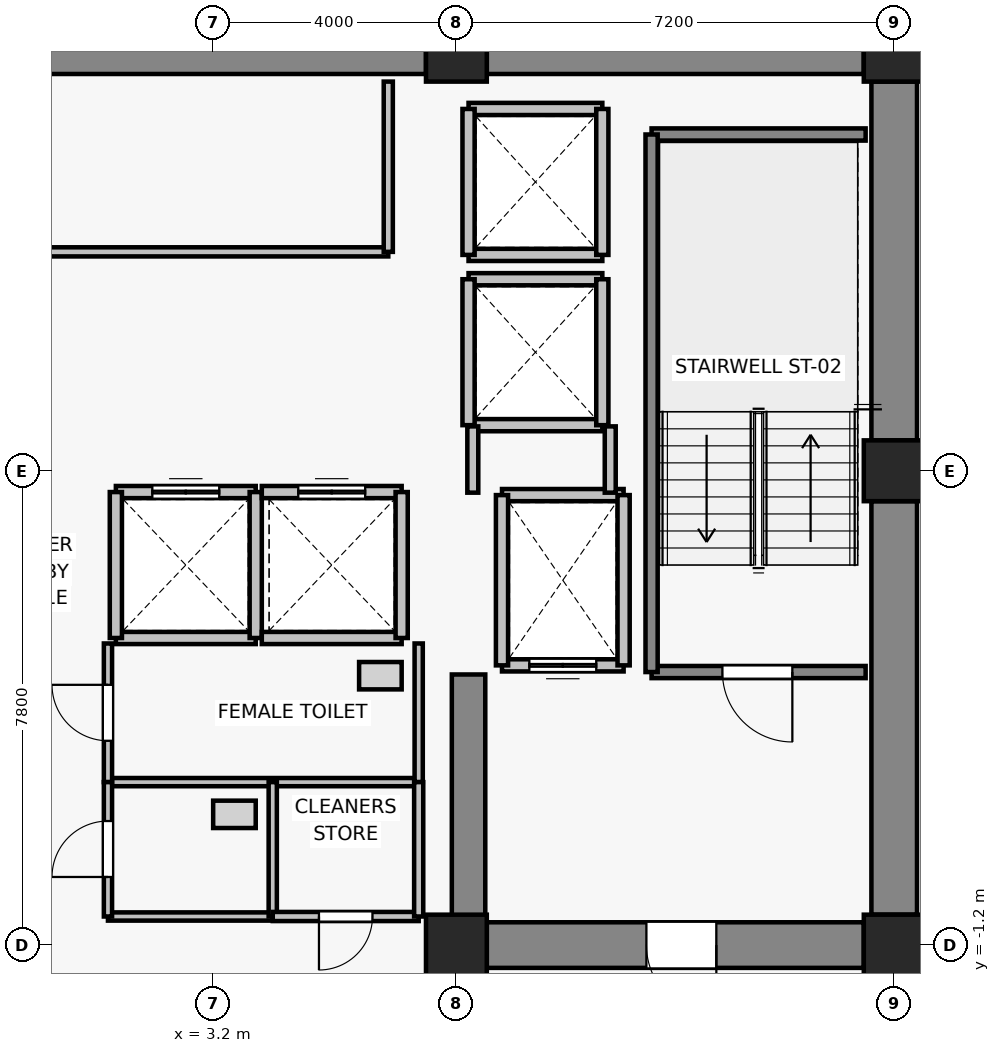
"""IFC4 building model, lengths in metres.
Left out: names, types, materials, properties, quantities, classifications, styles, units other than length and angle.
Written with IfcOpenShell. Run it as: python <this file> out.ifc"""

import sys

from ifc_helpers import new_model, si_unit, direction, frame, frame_2d, origin, origin_2d, place, context, subcontext, project, spatial, rectangle, extrude, source, transform, mapped, element, fill, save


model = new_model("IFC4")
c1 = context("Model", 3, precision=1e-05, world=origin(), true_north=direction((0.0, 1.0)))
c2 = subcontext(c1, "Body", "Model", "MODEL_VIEW")
j1 = project(units=[si_unit("LENGTHUNIT", "METRE"), si_unit("PLANEANGLEUNIT", "RADIAN")], contexts=[c1])
p1 = place(None, origin())
s1 = spatial("IfcSite", under=j1, at=p1, CompositionType="ELEMENT")
p2 = place(p1, origin())
s2 = spatial("IfcBuilding", under=s1, at=p2, CompositionType="ELEMENT")
p3 = place(p2, frame((0.0, 0.0, 166.0)))
s3 = spatial("IfcBuildingStorey", under=s2, at=p3, CompositionType="ELEMENT", Elevation=166.0)
for number, where, z_axis, x_axis in (
    (1, (7.2, -1.2, 0.0), (0.0, 0.0, 1.0), (1.0, 0.0, 0.0)),
    (2, (14.4, -1.2, 0.0), (0.0, 0.0, 1.0), (1.0, 0.0, 0.0)),
    (3, (14.4, 6.6, 0.0), (0.0, 0.0, 1.0), (1.0, 0.0, 0.0)),
    (4, (7.2, 13.5, 0.0), (0.0, 0.0, 1.0), (1.0, 0.0, 0.0)),
    (5, (14.4, 13.5, 0.0), (0.0, 0.0, 1.0), (1.0, 0.0, 0.0)),
):
    element("IfcColumn", number, at=place(p3, frame(where, z_axis=z_axis, x_axis=x_axis)), inside=s3, PredefinedType="COLUMN", context=c2, shape_type="SweptSolid", body=[
        extrude(rectangle(XDim=1.0, YDim=1.0, at=origin_2d()), origin(), (0.0, 0.0, 1.0), 3.3),
    ])
p4 = place(p3, frame((-6.7, 13.5, 0.0), z_axis=(0.0, 0.0, 1.0), x_axis=(1.0, 0.0, 0.0)))
e6 = element("IfcWall", 6, at=p4, inside=s3, PredefinedType="SHEAR", context=c2, shape_type="SweptSolid", body=[
    extrude(rectangle(XDim=13.4, YDim=0.75, at=frame_2d((6.7, 0.0))), origin(), (0.0, 0.0, 1.0), 3.075),
])
p5 = place(p3, frame((7.7, 13.5, 0.0), z_axis=(0.0, 0.0, 1.0), x_axis=(1.0, 0.0, 0.0)))
e7 = element("IfcWall", 7, at=p5, inside=s3, PredefinedType="SHEAR", context=c2, shape_type="SweptSolid", body=[
    extrude(rectangle(XDim=6.2, YDim=0.75, at=frame_2d((3.1, 0.0))), origin(), (0.0, 0.0, 1.0), 3.075),
])
p6 = place(p3, frame((14.4, -0.7, 0.0), z_axis=(0.0, 0.0, 1.0), x_axis=(0.0, 1.0, 0.0)))
e8 = element("IfcWall", 8, at=p6, inside=s3, PredefinedType="SHEAR", context=c2, shape_type="SweptSolid", body=[
    extrude(rectangle(XDim=6.8, YDim=0.75, at=frame_2d((3.4, 0.0))), origin(), (0.0, 0.0, 1.0), 3.075),
])
p7 = place(p3, frame((14.4, 7.1, 0.0), z_axis=(0.0, 0.0, 1.0), x_axis=(0.0, 1.0, 0.0)))
e9 = element("IfcWall", 9, at=p7, inside=s3, PredefinedType="SHEAR", context=c2, shape_type="SweptSolid", body=[
    extrude(rectangle(XDim=5.9, YDim=0.75, at=frame_2d((2.95, 0.0))), origin(), (0.0, 0.0, 1.0), 3.075),
])
p8 = place(p3, frame((13.9, -1.2, 0.0), z_axis=(0.0, 0.0, 1.0), x_axis=(-1.0, 0.0, 0.0)))
e10 = element("IfcWall", 10, at=p8, inside=s3, PredefinedType="SHEAR", context=c2, shape_type="SweptSolid", body=[
    extrude(rectangle(XDim=6.2, YDim=0.75, at=frame_2d((3.1, 0.0))), origin(), (0.0, 0.0, 1.0), 3.075),
])
p9 = place(p8, frame((2.425, 0.0, 0.0)))
e11 = element("IfcOpeningElement", 11, at=p9, cuts=e10, PredefinedType="OPENING", context=c2, shape_type="SweptSolid", body=[
    extrude(rectangle(XDim=1.15, YDim=2.15, at=frame_2d((0.575, 1.075))), frame((0.0, 0.385, 0.0), z_axis=(0.0, -1.0, 0.0), x_axis=(1.0, 0.0, 0.0)), (0.0, 0.0, 1.0), 0.77),
])
p10 = place(p3, frame((7.4, -0.825, 0.0), z_axis=(0.0, 0.0, 1.0), x_axis=(0.0, 1.0, 0.0)))
e12 = element("IfcWall", 12, at=p10, inside=s3, PredefinedType="SHEAR", context=c2, shape_type="SweptSolid", body=[
    extrude(rectangle(XDim=4.075, YDim=0.55, at=frame_2d((2.038, 0.0))), origin(), (0.0, 0.0, 1.0), 3.075),
])
p11 = place(p3, frame((9.95, 3.4, 0.0), z_axis=(0.0, 0.0, 1.0), x_axis=(-1.0, 0.0, 0.0)))
e13 = element("IfcWall", 13, at=p11, inside=s3, PredefinedType="SOLIDWALL", context=c2, shape_type="SweptSolid", body=[
    extrude(rectangle(XDim=2.0, YDim=0.2, at=frame_2d((1.0, 0.0))), origin(), (0.0, 0.0, 1.0), 3.075),
])
p12 = place(p11, frame((0.45, 0.0, 0.0)))
e14 = element("IfcOpeningElement", 14, at=p12, cuts=e13, PredefinedType="OPENING", context=c2, shape_type="SweptSolid", body=[
    extrude(rectangle(XDim=1.1, YDim=2.2, at=frame_2d((0.55, 1.1))), frame((0.0, 0.11, 0.0), z_axis=(0.0, -1.0, 0.0), x_axis=(1.0, 0.0, 0.0)), (0.0, 0.0, 1.0), 0.22),
])
p13 = place(p3, frame((7.95, 6.2, 0.0), z_axis=(0.0, 0.0, 1.0), x_axis=(1.0, 0.0, 0.0)))
e15 = element("IfcWall", 15, at=p13, inside=s3, PredefinedType="SOLIDWALL", context=c2, shape_type="SweptSolid", body=[
    extrude(rectangle(XDim=2.0, YDim=0.2, at=frame_2d((1.0, 0.0))), origin(), (0.0, 0.0, 1.0), 3.075),
])
for number, where, z_axis, x_axis in (
    (16, (7.95, 3.4, 0.0), (0.0, 0.0, 1.0), (0.0, 1.0, 0.0)),
    (17, (9.95, 6.2, 0.0), (0.0, 0.0, 1.0), (0.0, -1.0, 0.0)),
):
    element("IfcWall", number, at=place(p3, frame(where, z_axis=z_axis, x_axis=x_axis)), inside=s3, PredefinedType="SOLIDWALL", context=c2, shape_type="SweptSolid", body=[
        extrude(rectangle(XDim=2.8, YDim=0.2, at=frame_2d((1.4, 0.0))), origin(), (0.0, 0.0, 1.0), 3.075),
    ])
p14 = place(p3, frame((3.9, 3.85, 0.0), z_axis=(0.0, 0.0, 1.0), x_axis=(-1.0, 0.0, 0.0)))
e18 = element("IfcWall", 18, at=p14, inside=s3, PredefinedType="SOLIDWALL", context=c2, shape_type="SweptSolid", body=[
    extrude(rectangle(XDim=2.3, YDim=0.2, at=frame_2d((1.15, 0.0))), origin(), (0.0, 0.0, 1.0), 3.075),
])
p15 = place(p3, frame((1.6, 6.25, 0.0), z_axis=(0.0, 0.0, 1.0), x_axis=(1.0, 0.0, 0.0)))
e19 = element("IfcWall", 19, at=p15, inside=s3, PredefinedType="SOLIDWALL", context=c2, shape_type="SweptSolid", body=[
    extrude(rectangle(XDim=2.3, YDim=0.2, at=frame_2d((1.15, 0.0))), origin(), (0.0, 0.0, 1.0), 3.075),
])
p16 = place(p15, frame((0.6, 0.0, 0.0)))
e20 = element("IfcOpeningElement", 20, at=p16, cuts=e19, PredefinedType="OPENING", context=c2, shape_type="SweptSolid", body=[
    extrude(rectangle(XDim=1.1, YDim=2.2, at=frame_2d((0.55, 1.1))), frame((0.0, 0.11, 0.0), z_axis=(0.0, -1.0, 0.0), x_axis=(1.0, 0.0, 0.0)), (0.0, 0.0, 1.0), 0.22),
])
for number, where, z_axis, x_axis in (
    (21, (1.6, 3.85, 0.0), (0.0, 0.0, 1.0), (0.0, 1.0, 0.0)),
    (22, (3.9, 6.25, 0.0), (0.0, 0.0, 1.0), (0.0, -1.0, 0.0)),
):
    element("IfcWall", number, at=place(p3, frame(where, z_axis=z_axis, x_axis=x_axis)), inside=s3, PredefinedType="SOLIDWALL", context=c2, shape_type="SweptSolid", body=[
        extrude(rectangle(XDim=2.4, YDim=0.2, at=frame_2d((1.2, 0.0))), origin(), (0.0, 0.0, 1.0), 3.075),
    ])
p17 = place(p3, frame((6.3, 3.85, 0.0), z_axis=(0.0, 0.0, 1.0), x_axis=(-1.0, 0.0, 0.0)))
e23 = element("IfcWall", 23, at=p17, inside=s3, PredefinedType="SOLIDWALL", context=c2, shape_type="SweptSolid", body=[
    extrude(rectangle(XDim=2.3, YDim=0.2, at=frame_2d((1.15, 0.0))), origin(), (0.0, 0.0, 1.0), 3.075),
])
p18 = place(p3, frame((4.0, 6.25, 0.0), z_axis=(0.0, 0.0, 1.0), x_axis=(1.0, 0.0, 0.0)))
e24 = element("IfcWall", 24, at=p18, inside=s3, PredefinedType="SOLIDWALL", context=c2, shape_type="SweptSolid", body=[
    extrude(rectangle(XDim=2.3, YDim=0.2, at=frame_2d((1.15, 0.0))), origin(), (0.0, 0.0, 1.0), 3.075),
])
p19 = place(p18, frame((0.6, 0.0, 0.0)))
e25 = element("IfcOpeningElement", 25, at=p19, cuts=e24, PredefinedType="OPENING", context=c2, shape_type="SweptSolid", body=[
    extrude(rectangle(XDim=1.1, YDim=2.2, at=frame_2d((0.55, 1.1))), frame((0.0, 0.11, 0.0), z_axis=(0.0, -1.0, 0.0), x_axis=(1.0, 0.0, 0.0)), (0.0, 0.0, 1.0), 0.22),
])
p20 = place(p3, frame((6.3, 6.25, 0.0), z_axis=(0.0, 0.0, 1.0), x_axis=(0.0, -1.0, 0.0)))
e26 = element("IfcWall", 26, at=p20, inside=s3, PredefinedType="SOLIDWALL", context=c2, shape_type="SweptSolid", body=[
    extrude(rectangle(XDim=2.4, YDim=0.2, at=frame_2d((1.2, 0.0))), origin(), (0.0, 0.0, 1.0), 3.075),
])
for number, where, z_axis, x_axis in (
    (27, (9.6, 7.35, 0.0), (0.0, 0.0, 1.0), (-1.0, 0.0, 0.0)),
    (28, (7.4, 9.75, 0.0), (0.0, 0.0, 1.0), (1.0, 0.0, 0.0)),
):
    element("IfcWall", number, at=place(p3, frame(where, z_axis=z_axis, x_axis=x_axis)), inside=s3, PredefinedType="SOLIDWALL", context=c2, shape_type="SweptSolid", body=[
        extrude(rectangle(XDim=2.2, YDim=0.2, at=frame_2d((1.1, 0.0))), origin(), (0.0, 0.0, 1.0), 2.565),
    ])
p21 = place(p3, frame((7.4, 7.35, 0.0), z_axis=(0.0, 0.0, 1.0), x_axis=(0.0, 1.0, 0.0)))
e29 = element("IfcWall", 29, at=p21, inside=s3, PredefinedType="SOLIDWALL", context=c2, shape_type="SweptSolid", body=[
    extrude(rectangle(XDim=2.4, YDim=0.2, at=frame_2d((1.2, 0.0))), origin(), (0.0, 0.0, 1.0), 2.565),
])
p22 = place(p3, frame((9.6, 9.75, 0.0), z_axis=(0.0, 0.0, 1.0), x_axis=(0.0, -1.0, 0.0)))
e30 = element("IfcWall", 30, at=p22, inside=s3, PredefinedType="SOLIDWALL", context=c2, shape_type="SweptSolid", body=[
    extrude(rectangle(XDim=2.4, YDim=0.2, at=frame_2d((1.2, 0.0))), origin(), (0.0, 0.0, 1.0), 3.075),
])
for number, where, z_axis, x_axis in (
    (31, (9.6, 10.15, 0.0), (0.0, 0.0, 1.0), (-1.0, 0.0, 0.0)),
    (32, (7.4, 12.55, 0.0), (0.0, 0.0, 1.0), (1.0, 0.0, 0.0)),
):
    element("IfcWall", number, at=place(p3, frame(where, z_axis=z_axis, x_axis=x_axis)), inside=s3, PredefinedType="SOLIDWALL", context=c2, shape_type="SweptSolid", body=[
        extrude(rectangle(XDim=2.2, YDim=0.2, at=frame_2d((1.1, 0.0))), origin(), (0.0, 0.0, 1.0), 2.565),
    ])
p23 = place(p3, frame((7.4, 10.15, 0.0), z_axis=(0.0, 0.0, 1.0), x_axis=(0.0, 1.0, 0.0)))
e33 = element("IfcWall", 33, at=p23, inside=s3, PredefinedType="SOLIDWALL", context=c2, shape_type="SweptSolid", body=[
    extrude(rectangle(XDim=2.4, YDim=0.2, at=frame_2d((1.2, 0.0))), origin(), (0.0, 0.0, 1.0), 2.565),
])
p24 = place(p3, frame((9.6, 12.55, 0.0), z_axis=(0.0, 0.0, 1.0), x_axis=(0.0, -1.0, 0.0)))
e34 = element("IfcWall", 34, at=p24, inside=s3, PredefinedType="SOLIDWALL", context=c2, shape_type="SweptSolid", body=[
    extrude(rectangle(XDim=2.4, YDim=0.2, at=frame_2d((1.2, 0.0))), origin(), (0.0, 0.0, 1.0), 3.075),
])
p25 = place(p3, frame((13.93, 3.29, 0.0), z_axis=(0.0, 0.0, 1.0), x_axis=(-1.0, 0.0, 0.0)))
e35 = element("IfcWall", 35, at=p25, inside=s3, PredefinedType="SOLIDWALL", context=c2, shape_type="SweptSolid", body=[
    extrude(rectangle(XDim=3.52, YDim=0.2, at=frame_2d((1.76, 0.0))), origin(), (0.0, 0.0, 1.0), 3.075),
])
p26 = place(p25, frame((1.205, 0.0, 0.0)))
e36 = element("IfcOpeningElement", 36, at=p26, cuts=e35, PredefinedType="OPENING", context=c2, shape_type="SweptSolid", body=[
    extrude(rectangle(XDim=1.15, YDim=2.15, at=frame_2d((0.575, 1.075))), frame((0.0, 0.11, 0.0), z_axis=(0.0, -1.0, 0.0), x_axis=(1.0, 0.0, 0.0)), (0.0, 0.0, 1.0), 0.22),
])
p27 = place(p3, frame((10.41, 12.13, 0.0), z_axis=(0.0, 0.0, 1.0), x_axis=(1.0, 0.0, 0.0)))
e37 = element("IfcWall", 37, at=p27, inside=s3, PredefinedType="SOLIDWALL", context=c2, shape_type="SweptSolid", body=[
    extrude(rectangle(XDim=3.52, YDim=0.2, at=frame_2d((1.76, 0.0))), origin(), (0.0, 0.0, 1.0), 3.075),
])
p28 = place(p3, frame((10.41, 3.29, 0.0), z_axis=(0.0, 0.0, 1.0), x_axis=(0.0, 1.0, 0.0)))
e38 = element("IfcWall", 38, at=p28, inside=s3, PredefinedType="SOLIDWALL", context=c2, shape_type="SweptSolid", body=[
    extrude(rectangle(XDim=8.84, YDim=0.2, at=frame_2d((4.42, 0.0))), origin(), (0.0, 0.0, 1.0), 3.075),
])
p29 = place(p3, frame((7.47, 6.24, 0.0), z_axis=(0.0, 0.0, 1.0), x_axis=(0.0, 1.0, 0.0)))
e39 = element("IfcWall", 39, at=p29, inside=s3, PredefinedType="PARTITIONING", context=c2, shape_type="SweptSolid", body=[
    extrude(rectangle(XDim=1.09, YDim=0.18, at=frame_2d((0.545, 0.0))), origin(), (0.0, 0.0, 1.0), 2.565),
])
p30 = place(p3, frame((9.73, 7.33, 0.0), z_axis=(0.0, 0.0, 1.0), x_axis=(0.0, -1.0, 0.0)))
e40 = element("IfcWall", 40, at=p30, inside=s3, PredefinedType="PARTITIONING", context=c2, shape_type="SweptSolid", body=[
    extrude(rectangle(XDim=1.09, YDim=0.18, at=frame_2d((0.545, 0.0))), origin(), (0.0, 0.0, 1.0), 3.075),
])
p31 = place(p3, frame((6.08, 10.2, 0.0), z_axis=(0.0, 0.0, 1.0), x_axis=(-1.0, 0.0, 0.0)))
e41 = element("IfcWall", 41, at=p31, inside=s3, PredefinedType="PARTITIONING", context=c2, shape_type="SweptSolid", body=[
    extrude(rectangle(XDim=12.16, YDim=0.15, at=frame_2d((6.08, 0.0))), origin(), (0.0, 0.0, 1.0), 3.075),
])
p32 = place(p31, frame((7.005, 0.0, 0.0)))
e42 = element("IfcOpeningElement", 42, at=p32, cuts=e41, PredefinedType="OPENING", context=c2, shape_type="SweptSolid", body=[
    extrude(rectangle(XDim=1.15, YDim=2.15, at=frame_2d((0.575, 1.075))), frame((0.0, 0.085, 0.0), z_axis=(0.0, -1.0, 0.0), x_axis=(1.0, 0.0, 0.0)), (0.0, 0.0, 1.0), 0.17),
])
p33 = place(p3, frame((6.08, 13.0, 0.0), z_axis=(0.0, 0.0, 1.0), x_axis=(0.0, -1.0, 0.0)))
e43 = element("IfcWall", 43, at=p33, inside=s3, PredefinedType="PARTITIONING", context=c2, shape_type="SweptSolid", body=[
    extrude(rectangle(XDim=2.8, YDim=0.15, at=frame_2d((1.4, 0.0))), origin(), (0.0, 0.0, 1.0), 3.075),
])
p34 = place(p3, frame((6.58, 1.48, 0.0), z_axis=(0.0, 0.0, 1.0), x_axis=(-1.0, 0.0, 0.0)))
e44 = element("IfcWall", 44, at=p34, inside=s3, PredefinedType="PARTITIONING", context=c2, shape_type="SweptSolid", body=[
    extrude(rectangle(XDim=5.11, YDim=0.135, at=frame_2d((2.555, 0.0))), origin(), (0.0, 0.0, 1.0), 3.075),
])
p35 = place(p3, frame((1.47, 1.48, 0.0), z_axis=(0.0, 0.0, 1.0), x_axis=(0.0, 1.0, 0.0)))
e45 = element("IfcWall", 45, at=p35, inside=s3, PredefinedType="PARTITIONING", context=c2, shape_type="SweptSolid", body=[
    extrude(rectangle(XDim=2.28, YDim=0.135, at=frame_2d((1.14, 0.0))), origin(), (0.0, 0.0, 1.0), 3.075),
])
p36 = place(p35, frame((0.68, 0.0, 0.0)))
e46 = element("IfcOpeningElement", 46, at=p36, cuts=e45, PredefinedType="OPENING", context=c2, shape_type="SweptSolid", body=[
    extrude(rectangle(XDim=0.92, YDim=2.1, at=frame_2d((0.46, 1.05))), frame((0.0, 0.077, 0.0), z_axis=(0.0, -1.0, 0.0), x_axis=(1.0, 0.0, 0.0)), (0.0, 0.0, 1.0), 0.155),
])
p37 = place(p3, frame((6.58, 3.76, 0.0), z_axis=(0.0, 0.0, 1.0), x_axis=(0.0, -1.0, 0.0)))
e47 = element("IfcWall", 47, at=p37, inside=s3, PredefinedType="PARTITIONING", context=c2, shape_type="SweptSolid", body=[
    extrude(rectangle(XDim=2.28, YDim=0.135, at=frame_2d((1.14, 0.0))), origin(), (0.0, 0.0, 1.0), 3.075),
])
p38 = place(p3, frame((4.18, -0.73, 0.0), z_axis=(0.0, 0.0, 1.0), x_axis=(-1.0, 0.0, 0.0)))
e48 = element("IfcWall", 48, at=p38, inside=s3, PredefinedType="PARTITIONING", context=c2, shape_type="SweptSolid", body=[
    extrude(rectangle(XDim=2.71, YDim=0.135, at=frame_2d((1.355, 0.0))), origin(), (0.0, 0.0, 1.0), 3.075),
])
p39 = place(p3, frame((1.47, -0.73, 0.0), z_axis=(0.0, 0.0, 1.0), x_axis=(0.0, 1.0, 0.0)))
e49 = element("IfcWall", 49, at=p39, inside=s3, PredefinedType="PARTITIONING", context=c2, shape_type="SweptSolid", body=[
    extrude(rectangle(XDim=2.21, YDim=0.135, at=frame_2d((1.105, 0.0))), origin(), (0.0, 0.0, 1.0), 3.075),
])
p40 = place(p39, frame((0.65, 0.0, 0.0)))
e50 = element("IfcOpeningElement", 50, at=p40, cuts=e49, PredefinedType="OPENING", context=c2, shape_type="SweptSolid", body=[
    extrude(rectangle(XDim=0.92, YDim=2.1, at=frame_2d((0.46, 1.05))), frame((0.0, 0.077, 0.0), z_axis=(0.0, -1.0, 0.0), x_axis=(1.0, 0.0, 0.0)), (0.0, 0.0, 1.0), 0.155),
])
p41 = place(p3, frame((4.18, 1.48, 0.0), z_axis=(0.0, 0.0, 1.0), x_axis=(0.0, -1.0, 0.0)))
e51 = element("IfcWall", 51, at=p41, inside=s3, PredefinedType="PARTITIONING", context=c2, shape_type="SweptSolid", body=[
    extrude(rectangle(XDim=2.21, YDim=0.135, at=frame_2d((1.105, 0.0))), origin(), (0.0, 0.0, 1.0), 3.075),
])
p42 = place(p3, frame((6.58, -0.73, 0.0), z_axis=(0.0, 0.0, 1.0), x_axis=(-1.0, 0.0, 0.0)))
e52 = element("IfcWall", 52, at=p42, inside=s3, PredefinedType="PARTITIONING", context=c2, shape_type="SweptSolid", body=[
    extrude(rectangle(XDim=2.4, YDim=0.15, at=frame_2d((1.2, 0.0))), origin(), (0.0, 0.0, 1.0), 3.075),
])
p43 = place(p42, frame((0.76, 0.0, 0.0)))
e53 = element("IfcOpeningElement", 53, at=p43, cuts=e52, PredefinedType="OPENING", context=c2, shape_type="SweptSolid", body=[
    extrude(rectangle(XDim=0.88, YDim=2.1, at=frame_2d((0.44, 1.05))), frame((0.0, 0.085, 0.0), z_axis=(0.0, -1.0, 0.0), x_axis=(1.0, 0.0, 0.0)), (0.0, 0.0, 1.0), 0.17),
])
p44 = place(p3, frame((6.58, 1.48, 0.0), z_axis=(0.0, 0.0, 1.0), x_axis=(0.0, -1.0, 0.0)))
e54 = element("IfcWall", 54, at=p44, inside=s3, PredefinedType="PARTITIONING", context=c2, shape_type="SweptSolid", body=[
    extrude(rectangle(XDim=2.21, YDim=0.15, at=frame_2d((1.105, 0.0))), origin(), (0.0, 0.0, 1.0), 3.075),
])
m1 = source(origin(), c2, "Body", "SweptSolid", [
    extrude(rectangle(XDim=1.1, YDim=2.2, at=frame_2d((0.55, 1.1))), frame((0.0, 0.025, 0.0), z_axis=(0.0, -1.0, 0.0), x_axis=(1.0, 0.0, 0.0)), (0.0, 0.0, 1.0), 0.05),
])
p45 = place(p12, origin())
e55 = element("IfcDoor", 55, at=p45, inside=s3, OperationType="DOUBLE_DOOR_SLIDING", PredefinedType="DOOR", context=c2, shape_type="MappedRepresentation", body=[
    mapped(m1, transform((0.0, 0.0, 0.0), x_axis=(1.0, 0.0, 0.0), y_axis=(0.0, 1.0, 0.0), z_axis=(0.0, 0.0, 1.0), scale=1.0)),
])
fill(e14, e55)
p46 = place(p16, origin())
e56 = element("IfcDoor", 56, at=p46, inside=s3, OperationType="DOUBLE_DOOR_SLIDING", PredefinedType="DOOR", context=c2, shape_type="MappedRepresentation", body=[
    mapped(m1, transform((0.0, 0.0, 0.0), x_axis=(1.0, 0.0, 0.0), y_axis=(0.0, 1.0, 0.0), z_axis=(0.0, 0.0, 1.0), scale=1.0)),
])
fill(e20, e56)
p47 = place(p19, origin())
e57 = element("IfcDoor", 57, at=p47, inside=s3, OperationType="DOUBLE_DOOR_SLIDING", PredefinedType="DOOR", context=c2, shape_type="MappedRepresentation", body=[
    mapped(m1, transform((0.0, 0.0, 0.0), x_axis=(1.0, 0.0, 0.0), y_axis=(0.0, 1.0, 0.0), z_axis=(0.0, 0.0, 1.0), scale=1.0)),
])
fill(e25, e57)
m2 = source(origin(), c2, "Body", "SweptSolid", [
    extrude(rectangle(XDim=1.15, YDim=2.15, at=frame_2d((0.575, 1.075))), frame((0.0, 0.025, 0.0), z_axis=(0.0, -1.0, 0.0), x_axis=(1.0, 0.0, 0.0)), (0.0, 0.0, 1.0), 0.05),
])
p48 = place(p26, origin())
e58 = element("IfcDoor", 58, at=p48, inside=s3, OperationType="SINGLE_SWING_LEFT", PredefinedType="DOOR", context=c2, shape_type="MappedRepresentation", body=[
    mapped(m2, transform((0.0, 0.0, 0.0), x_axis=(1.0, 0.0, 0.0), y_axis=(0.0, 1.0, 0.0), z_axis=(0.0, 0.0, 1.0), scale=1.0)),
])
fill(e36, e58)
p49 = place(p9, origin())
e59 = element("IfcDoor", 59, at=p49, inside=s3, OperationType="SINGLE_SWING_LEFT", PredefinedType="DOOR", context=c2, shape_type="MappedRepresentation", body=[
    mapped(m2, transform((0.0, 0.0, 0.0), x_axis=(1.0, 0.0, 0.0), y_axis=(0.0, 1.0, 0.0), z_axis=(0.0, 0.0, 1.0), scale=1.0)),
])
fill(e11, e59)
m3 = source(origin(), c2, "Body", "SweptSolid", [
    extrude(rectangle(XDim=0.92, YDim=2.1, at=frame_2d((0.46, 1.05))), frame((0.0, 0.025, 0.0), z_axis=(0.0, -1.0, 0.0), x_axis=(1.0, 0.0, 0.0)), (0.0, 0.0, 1.0), 0.05),
])
p50 = place(p36, origin())
e60 = element("IfcDoor", 60, at=p50, inside=s3, OperationType="SINGLE_SWING_RIGHT", PredefinedType="DOOR", context=c2, shape_type="MappedRepresentation", body=[
    mapped(m3, transform((0.0, 0.0, 0.0), x_axis=(1.0, 0.0, 0.0), y_axis=(0.0, 1.0, 0.0), z_axis=(0.0, 0.0, 1.0), scale=1.0)),
])
fill(e46, e60)
p51 = place(p40, origin())
e61 = element("IfcDoor", 61, at=p51, inside=s3, OperationType="SINGLE_SWING_LEFT", PredefinedType="DOOR", context=c2, shape_type="MappedRepresentation", body=[
    mapped(m3, transform((0.0, 0.0, 0.0), x_axis=(1.0, 0.0, 0.0), y_axis=(0.0, 1.0, 0.0), z_axis=(0.0, 0.0, 1.0), scale=1.0)),
])
fill(e50, e61)
m4 = source(origin(), c2, "Body", "SweptSolid", [
    extrude(rectangle(XDim=0.88, YDim=2.1, at=frame_2d((0.44, 1.05))), frame((0.0, 0.025, 0.0), z_axis=(0.0, -1.0, 0.0), x_axis=(1.0, 0.0, 0.0)), (0.0, 0.0, 1.0), 0.05),
])
p52 = place(p43, origin())
e62 = element("IfcDoor", 62, at=p52, inside=s3, OperationType="SINGLE_SWING_RIGHT", PredefinedType="DOOR", context=c2, shape_type="MappedRepresentation", body=[
    mapped(m4, transform((0.0, 0.0, 0.0), x_axis=(1.0, 0.0, 0.0), y_axis=(0.0, 1.0, 0.0), z_axis=(0.0, 0.0, 1.0), scale=1.0)),
])
fill(e53, e62)
save(model, sys.argv[1])
